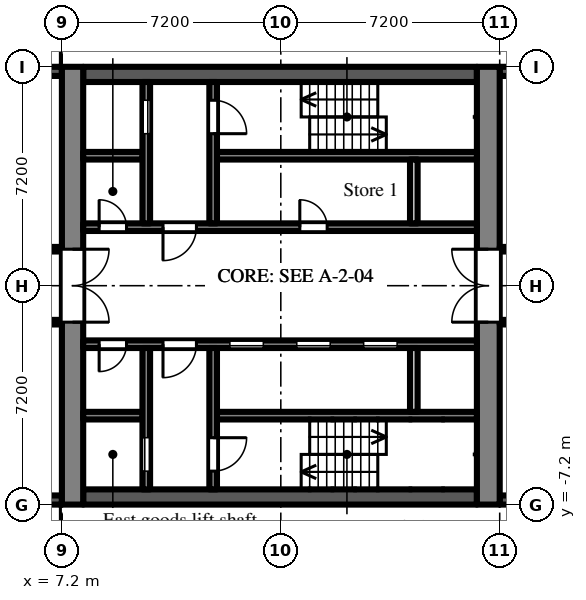
"""IFC4 building model, lengths in metres.
Left out: names, types, materials, properties, quantities, classifications, styles, units other than length and angle.
Written with IfcOpenShell. Run it as: python <this file> out.ifc"""

import sys

from ifc_helpers import new_model, si_unit, direction, frame, frame_2d, origin, place, context, subcontext, project, spatial, rectangle, extrude, element, fill, save


model = new_model("IFC4")
c1 = context("Model", 3, precision=1e-05, world=origin(), true_north=direction((0.0, 1.0)))
c2 = subcontext(c1, "Body", "Model", "MODEL_VIEW")
j1 = project(units=[si_unit("LENGTHUNIT", "METRE"), si_unit("PLANEANGLEUNIT", "RADIAN")], contexts=[c1])
p1 = place(None, origin())
s1 = spatial("IfcSite", under=j1, at=p1, CompositionType="ELEMENT")
p2 = place(p1, origin())
s2 = spatial("IfcBuilding", under=s1, at=p2, CompositionType="ELEMENT")
p3 = place(p2, frame((0.0, 0.0, 11.7)))
s3 = spatial("IfcBuildingStorey", under=s2, at=p3, CompositionType="ELEMENT", Elevation=11.7)
p4 = place(p3, frame((21.6, -7.05, 0.0), z_axis=(0.0, 0.0, 1.0), x_axis=(1.0, 0.0, 0.0)))
e1 = element("IfcWall", 1, at=p4, inside=s3, PredefinedType="SOLIDWALL", context=c2, shape_type="SweptSolid", body=[
    extrude(rectangle(XDim=2.7, YDim=0.3, at=frame_2d((1.35, 0.0))), origin(), (0.0, 0.0, 1.0), 2.1),
])
p5 = place(p4, frame((0.75, 0.0, 0.2)))
e2 = element("IfcOpeningElement", 2, at=p5, cuts=e1, PredefinedType="OPENING", context=c2, shape_type="SweptSolid", body=[
    extrude(rectangle(XDim=1.2, YDim=1.85, at=frame_2d((0.6, 0.925))), frame((0.0, 0.16, 0.0), z_axis=(0.0, -1.0, 0.0), x_axis=(1.0, 0.0, 0.0)), (0.0, 0.0, 1.0), 0.32),
])
p6 = place(p3, frame((24.3, 7.05, 0.0), z_axis=(0.0, 0.0, 1.0), x_axis=(-1.0, 0.0, 0.0)))
e3 = element("IfcWall", 3, at=p6, inside=s3, PredefinedType="SOLIDWALL", context=c2, shape_type="SweptSolid", body=[
    extrude(rectangle(XDim=2.7, YDim=0.3, at=frame_2d((1.35, 0.0))), origin(), (0.0, 0.0, 1.0), 2.1),
])
p7 = place(p6, frame((0.75, 0.0, 0.2)))
e4 = element("IfcOpeningElement", 4, at=p7, cuts=e3, PredefinedType="OPENING", context=c2, shape_type="SweptSolid", body=[
    extrude(rectangle(XDim=1.2, YDim=1.85, at=frame_2d((0.6, 0.925))), frame((0.0, 0.16, 0.0), z_axis=(0.0, -1.0, 0.0), x_axis=(1.0, 0.0, 0.0)), (0.0, 0.0, 1.0), 0.32),
])
for number, where, z_axis, x_axis in (
    (5, (7.2, 7.05, 0.0), (0.0, 0.0, 1.0), (-1.0, 0.0, 0.0)),
    (6, (4.2, -7.05, 0.0), (0.0, 0.0, 1.0), (1.0, 0.0, 0.0)),
):
    element("IfcWall", number, at=place(p3, frame(where, z_axis=z_axis, x_axis=x_axis)), inside=s3, PredefinedType="SOLIDWALL", context=c2, shape_type="SweptSolid", body=[
        extrude(rectangle(XDim=3.0, YDim=0.3, at=frame_2d((1.5, 0.0))), origin(), (0.0, 0.0, 1.0), 2.1),
    ])
p8 = place(p3, frame((7.55, -7.2, 0.0), z_axis=(0.0, 0.0, 1.0), x_axis=(0.0, 1.0, 0.0)))
e7 = element("IfcWall", 7, at=p8, inside=s3, PredefinedType="SHEAR", context=c2, shape_type="SweptSolid", body=[
    extrude(rectangle(XDim=14.4, YDim=0.7, at=frame_2d((7.2, 0.0))), origin(), (0.0, 0.0, 1.0), 2.575),
])
p9 = place(p8, frame((6.0, 0.0, 0.0)))
e8 = element("IfcOpeningElement", 8, at=p9, cuts=e7, PredefinedType="OPENING", context=c2, shape_type="SweptSolid", body=[
    extrude(rectangle(XDim=2.4, YDim=2.2, at=frame_2d((1.2, 1.1))), frame((0.0, 0.36, 0.0), z_axis=(0.0, -1.0, 0.0), x_axis=(1.0, 0.0, 0.0)), (0.0, 0.0, 1.0), 0.72),
])
p10 = place(p3, frame((21.225, -7.2, 0.0), z_axis=(0.0, 0.0, 1.0), x_axis=(0.0, 1.0, 0.0)))
e9 = element("IfcWall", 9, at=p10, inside=s3, PredefinedType="SHEAR", context=c2, shape_type="SweptSolid", body=[
    extrude(rectangle(XDim=14.4, YDim=0.75, at=frame_2d((7.2, 0.0))), origin(), (0.0, 0.0, 1.0), 2.575),
])
p11 = place(p10, frame((6.0, 0.0, 0.0)))
e10 = element("IfcOpeningElement", 10, at=p11, cuts=e9, PredefinedType="OPENING", context=c2, shape_type="SweptSolid", body=[
    extrude(rectangle(XDim=2.4, YDim=2.2, at=frame_2d((1.2, 1.1))), frame((0.0, 0.385, 0.0), z_axis=(0.0, -1.0, 0.0), x_axis=(1.0, 0.0, 0.0)), (0.0, 0.0, 1.0), 0.77),
])
p12 = place(p3, frame((7.9, 6.95, 0.0), z_axis=(0.0, 0.0, 1.0), x_axis=(1.0, 0.0, 0.0)))
e11 = element("IfcWall", 11, at=p12, inside=s3, PredefinedType="SHEAR", context=c2, shape_type="SweptSolid", body=[
    extrude(rectangle(XDim=12.95, YDim=0.5, at=frame_2d((6.475, 0.0))), origin(), (0.0, 0.0, 1.0), 2.575),
])
p13 = place(p3, frame((7.9, 1.925, 0.0), z_axis=(0.0, 0.0, 1.0), x_axis=(1.0, 0.0, 0.0)))
e12 = element("IfcWall", 12, at=p13, inside=s3, PredefinedType="SHEAR", context=c2, shape_type="SweptSolid", body=[
    extrude(rectangle(XDim=12.95, YDim=0.25, at=frame_2d((6.475, 0.0))), origin(), (0.0, 0.0, 1.0), 2.575),
])
p14 = place(p13, frame((0.525, 0.0, 0.0)))
e13 = element("IfcOpeningElement", 13, at=p14, cuts=e12, PredefinedType="OPENING", context=c2, shape_type="SweptSolid", body=[
    extrude(rectangle(XDim=0.9, YDim=2.1, at=frame_2d((0.45, 1.05))), frame((0.0, 0.135, 0.0), z_axis=(0.0, -1.0, 0.0), x_axis=(1.0, 0.0, 0.0)), (0.0, 0.0, 1.0), 0.27),
])
p15 = place(p13, frame((2.625, 0.0, 0.0)))
e14 = element("IfcOpeningElement", 14, at=p15, cuts=e12, PredefinedType="OPENING", context=c2, shape_type="SweptSolid", body=[
    extrude(rectangle(XDim=1.1, YDim=2.1, at=frame_2d((0.55, 1.05))), frame((0.0, 0.135, 0.0), z_axis=(0.0, -1.0, 0.0), x_axis=(1.0, 0.0, 0.0)), (0.0, 0.0, 1.0), 0.27),
])
p16 = place(p13, frame((7.125, 0.0, 0.0)))
e15 = element("IfcOpeningElement", 15, at=p16, cuts=e12, PredefinedType="OPENING", context=c2, shape_type="SweptSolid", body=[
    extrude(rectangle(XDim=0.9, YDim=2.1, at=frame_2d((0.45, 1.05))), frame((0.0, 0.135, 0.0), z_axis=(0.0, -1.0, 0.0), x_axis=(1.0, 0.0, 0.0)), (0.0, 0.0, 1.0), 0.27),
])
p17 = place(p3, frame((7.9, 4.275, 0.0), z_axis=(0.0, 0.0, 1.0), x_axis=(1.0, 0.0, 0.0)))
e16 = element("IfcWall", 16, at=p17, inside=s3, PredefinedType="SHEAR", context=c2, shape_type="SweptSolid", body=[
    extrude(rectangle(XDim=1.95, YDim=0.25, at=frame_2d((0.975, 0.0))), origin(), (0.0, 0.0, 1.0), 2.575),
])
p18 = place(p3, frame((12.3, 4.275, 0.0), z_axis=(0.0, 0.0, 1.0), x_axis=(1.0, 0.0, 0.0)))
e17 = element("IfcWall", 17, at=p18, inside=s3, PredefinedType="SHEAR", context=c2, shape_type="SweptSolid", body=[
    extrude(rectangle(XDim=8.55, YDim=0.25, at=frame_2d((4.275, 0.0))), origin(), (0.0, 0.0, 1.0), 2.575),
])
p19 = place(p3, frame((9.975, 2.05, 0.0), z_axis=(0.0, 0.0, 1.0), x_axis=(0.0, 1.0, 0.0)))
e18 = element("IfcWall", 18, at=p19, inside=s3, PredefinedType="SHEAR", context=c2, shape_type="SweptSolid", body=[
    extrude(rectangle(XDim=4.65, YDim=0.25, at=frame_2d((2.325, 0.0))), origin(), (0.0, 0.0, 1.0), 2.575),
])
p20 = place(p19, frame((2.95, 0.0, 0.0)))
e19 = element("IfcOpeningElement", 19, at=p20, cuts=e18, PredefinedType="OPENING", context=c2, shape_type="SweptSolid", body=[
    extrude(rectangle(XDim=1.1, YDim=2.1, at=frame_2d((0.55, 1.05))), frame((0.0, 0.135, 0.0), z_axis=(0.0, -1.0, 0.0), x_axis=(1.0, 0.0, 0.0)), (0.0, 0.0, 1.0), 0.27),
])
p21 = place(p3, frame((12.175, 2.05, 0.0), z_axis=(0.0, 0.0, 1.0), x_axis=(0.0, 1.0, 0.0)))
e20 = element("IfcWall", 20, at=p21, inside=s3, PredefinedType="SHEAR", context=c2, shape_type="SweptSolid", body=[
    extrude(rectangle(XDim=4.65, YDim=0.25, at=frame_2d((2.325, 0.0))), origin(), (0.0, 0.0, 1.0), 2.575),
])
p22 = place(p21, frame((2.95, 0.0, 0.0)))
e21 = element("IfcOpeningElement", 21, at=p22, cuts=e20, PredefinedType="OPENING", context=c2, shape_type="SweptSolid", body=[
    extrude(rectangle(XDim=1.1, YDim=2.1, at=frame_2d((0.55, 1.05))), frame((0.0, 0.135, 0.0), z_axis=(0.0, -1.0, 0.0), x_axis=(1.0, 0.0, 0.0)), (0.0, 0.0, 1.0), 0.27),
])
p23 = place(p3, frame((18.775, 2.05, 0.0), z_axis=(0.0, 0.0, 1.0), x_axis=(0.0, 1.0, 0.0)))
e22 = element("IfcWall", 22, at=p23, inside=s3, PredefinedType="PARTITIONING", context=c2, shape_type="SweptSolid", body=[
    extrude(rectangle(XDim=2.1, YDim=0.25, at=frame_2d((1.05, 0.0))), origin(), (0.0, 0.0, 1.0), 2.575),
])
p24 = place(p3, frame((7.9, -6.95, 0.0), z_axis=(0.0, 0.0, 1.0), x_axis=(1.0, 0.0, 0.0)))
e23 = element("IfcWall", 23, at=p24, inside=s3, PredefinedType="SHEAR", context=c2, shape_type="SweptSolid", body=[
    extrude(rectangle(XDim=12.95, YDim=0.5, at=frame_2d((6.475, 0.0))), origin(), (0.0, 0.0, 1.0), 2.575),
])
p25 = place(p3, frame((7.9, -1.925, 0.0), z_axis=(0.0, 0.0, 1.0), x_axis=(1.0, 0.0, 0.0)))
e24 = element("IfcWall", 24, at=p25, inside=s3, PredefinedType="SHEAR", context=c2, shape_type="SweptSolid", body=[
    extrude(rectangle(XDim=12.95, YDim=0.25, at=frame_2d((6.475, 0.0))), origin(), (0.0, 0.0, 1.0), 2.575),
])
p26 = place(p25, frame((4.825, 0.0, 0.0)))
e25 = element("IfcOpeningElement", 25, at=p26, cuts=e24, PredefinedType="OPENING", context=c2, shape_type="SweptSolid", body=[
    extrude(rectangle(XDim=1.1, YDim=2.1, at=frame_2d((0.55, 1.05))), frame((0.0, 0.135, 0.0), z_axis=(0.0, -1.0, 0.0), x_axis=(1.0, 0.0, 0.0)), (0.0, 0.0, 1.0), 0.27),
])
p27 = place(p25, frame((7.025, 0.0, 0.0)))
e26 = element("IfcOpeningElement", 26, at=p27, cuts=e24, PredefinedType="OPENING", context=c2, shape_type="SweptSolid", body=[
    extrude(rectangle(XDim=1.1, YDim=2.1, at=frame_2d((0.55, 1.05))), frame((0.0, 0.135, 0.0), z_axis=(0.0, -1.0, 0.0), x_axis=(1.0, 0.0, 0.0)), (0.0, 0.0, 1.0), 0.27),
])
p28 = place(p25, frame((9.225, 0.0, 0.0)))
e27 = element("IfcOpeningElement", 27, at=p28, cuts=e24, PredefinedType="OPENING", context=c2, shape_type="SweptSolid", body=[
    extrude(rectangle(XDim=1.1, YDim=2.1, at=frame_2d((0.55, 1.05))), frame((0.0, 0.135, 0.0), z_axis=(0.0, -1.0, 0.0), x_axis=(1.0, 0.0, 0.0)), (0.0, 0.0, 1.0), 0.27),
])
p29 = place(p25, frame((0.525, 0.0, 0.0)))
e28 = element("IfcOpeningElement", 28, at=p29, cuts=e24, PredefinedType="OPENING", context=c2, shape_type="SweptSolid", body=[
    extrude(rectangle(XDim=0.9, YDim=2.1, at=frame_2d((0.45, 1.05))), frame((0.0, 0.135, 0.0), z_axis=(0.0, -1.0, 0.0), x_axis=(1.0, 0.0, 0.0)), (0.0, 0.0, 1.0), 0.27),
])
p30 = place(p25, frame((2.625, 0.0, 0.0)))
e29 = element("IfcOpeningElement", 29, at=p30, cuts=e24, PredefinedType="OPENING", context=c2, shape_type="SweptSolid", body=[
    extrude(rectangle(XDim=1.1, YDim=2.1, at=frame_2d((0.55, 1.05))), frame((0.0, 0.135, 0.0), z_axis=(0.0, -1.0, 0.0), x_axis=(1.0, 0.0, 0.0)), (0.0, 0.0, 1.0), 0.27),
])
p31 = place(p3, frame((7.9, -4.275, 0.0), z_axis=(0.0, 0.0, 1.0), x_axis=(1.0, 0.0, 0.0)))
e30 = element("IfcWall", 30, at=p31, inside=s3, PredefinedType="SHEAR", context=c2, shape_type="SweptSolid", body=[
    extrude(rectangle(XDim=1.95, YDim=0.25, at=frame_2d((0.975, 0.0))), origin(), (0.0, 0.0, 1.0), 2.575),
])
p32 = place(p3, frame((12.3, -4.275, 0.0), z_axis=(0.0, 0.0, 1.0), x_axis=(1.0, 0.0, 0.0)))
e31 = element("IfcWall", 31, at=p32, inside=s3, PredefinedType="SHEAR", context=c2, shape_type="SweptSolid", body=[
    extrude(rectangle(XDim=8.55, YDim=0.25, at=frame_2d((4.275, 0.0))), origin(), (0.0, 0.0, 1.0), 2.575),
])
p33 = place(p3, frame((9.975, -2.05, 0.0), z_axis=(0.0, 0.0, 1.0), x_axis=(0.0, -1.0, 0.0)))
e32 = element("IfcWall", 32, at=p33, inside=s3, PredefinedType="SHEAR", context=c2, shape_type="SweptSolid", body=[
    extrude(rectangle(XDim=4.65, YDim=0.25, at=frame_2d((2.325, 0.0))), origin(), (0.0, 0.0, 1.0), 2.575),
])
p34 = place(p33, frame((2.95, 0.0, 0.0)))
e33 = element("IfcOpeningElement", 33, at=p34, cuts=e32, PredefinedType="OPENING", context=c2, shape_type="SweptSolid", body=[
    extrude(rectangle(XDim=1.1, YDim=2.1, at=frame_2d((0.55, 1.05))), frame((0.0, 0.135, 0.0), z_axis=(0.0, -1.0, 0.0), x_axis=(1.0, 0.0, 0.0)), (0.0, 0.0, 1.0), 0.27),
])
p35 = place(p3, frame((12.175, -2.05, 0.0), z_axis=(0.0, 0.0, 1.0), x_axis=(0.0, -1.0, 0.0)))
e34 = element("IfcWall", 34, at=p35, inside=s3, PredefinedType="SHEAR", context=c2, shape_type="SweptSolid", body=[
    extrude(rectangle(XDim=4.65, YDim=0.25, at=frame_2d((2.325, 0.0))), origin(), (0.0, 0.0, 1.0), 2.575),
])
p36 = place(p35, frame((2.95, 0.0, 0.0)))
e35 = element("IfcOpeningElement", 35, at=p36, cuts=e34, PredefinedType="OPENING", context=c2, shape_type="SweptSolid", body=[
    extrude(rectangle(XDim=1.1, YDim=2.1, at=frame_2d((0.55, 1.05))), frame((0.0, 0.135, 0.0), z_axis=(0.0, -1.0, 0.0), x_axis=(1.0, 0.0, 0.0)), (0.0, 0.0, 1.0), 0.27),
])
p37 = place(p3, frame((18.775, -2.05, 0.0), z_axis=(0.0, 0.0, 1.0), x_axis=(0.0, -1.0, 0.0)))
e36 = element("IfcWall", 36, at=p37, inside=s3, PredefinedType="PARTITIONING", context=c2, shape_type="SweptSolid", body=[
    extrude(rectangle(XDim=2.1, YDim=0.25, at=frame_2d((1.05, 0.0))), origin(), (0.0, 0.0, 1.0), 2.575),
])
p38 = place(p3, frame((1.275, -1.2, 0.0), z_axis=(0.0, 0.0, 1.0), x_axis=(1.0, 0.0, 0.0)))
e37 = element("IfcWall", 37, at=p38, inside=s3, PredefinedType="PARTITIONING", context=c2, shape_type="SweptSolid", body=[
    extrude(rectangle(XDim=5.925, YDim=0.15, at=frame_2d((2.962, 0.0))), origin(), (0.0, 0.0, 1.0), 2.575),
])
p39 = place(p38, frame((3.075, 0.0, 0.0)))
e38 = element("IfcOpeningElement", 38, at=p39, cuts=e37, PredefinedType="OPENING", context=c2, shape_type="SweptSolid", body=[
    extrude(rectangle(XDim=0.9, YDim=2.1, at=frame_2d((0.45, 1.05))), frame((0.0, 0.085, 0.0), z_axis=(0.0, -1.0, 0.0), x_axis=(1.0, 0.0, 0.0)), (0.0, 0.0, 1.0), 0.17),
])
p40 = place(p3, frame((1.275, 1.2, 0.0), z_axis=(0.0, 0.0, 1.0), x_axis=(1.0, 0.0, 0.0)))
e39 = element("IfcWall", 39, at=p40, inside=s3, PredefinedType="PARTITIONING", context=c2, shape_type="SweptSolid", body=[
    extrude(rectangle(XDim=5.925, YDim=0.15, at=frame_2d((2.962, 0.0))), origin(), (0.0, 0.0, 1.0), 2.575),
])
p41 = place(p40, frame((3.975, 0.0, 0.0)))
e40 = element("IfcOpeningElement", 40, at=p41, cuts=e39, PredefinedType="OPENING", context=c2, shape_type="SweptSolid", body=[
    extrude(rectangle(XDim=0.9, YDim=2.1, at=frame_2d((0.45, 1.05))), frame((0.0, 0.085, 0.0), z_axis=(0.0, -1.0, 0.0), x_axis=(1.0, 0.0, 0.0)), (0.0, 0.0, 1.0), 0.17),
])
p42 = place(p3, frame((21.6, -1.2, 0.0), z_axis=(0.0, 0.0, 1.0), x_axis=(1.0, 0.0, 0.0)))
e41 = element("IfcWall", 41, at=p42, inside=s3, PredefinedType="PARTITIONING", context=c2, shape_type="SweptSolid", body=[
    extrude(rectangle(XDim=14.9, YDim=0.15, at=frame_2d((7.45, 0.0))), origin(), (0.0, 0.0, 1.0), 2.575),
])
p43 = place(p42, frame((2.7, 0.0, 0.0)))
e42 = element("IfcOpeningElement", 42, at=p43, cuts=e41, PredefinedType="OPENING", context=c2, shape_type="SweptSolid", body=[
    extrude(rectangle(XDim=1.8, YDim=2.1, at=frame_2d((0.9, 1.05))), frame((0.0, 0.085, 0.0), z_axis=(0.0, -1.0, 0.0), x_axis=(1.0, 0.0, 0.0)), (0.0, 0.0, 1.0), 0.17),
])
p44 = place(p42, frame((7.65, 0.0, 0.0)))
e43 = element("IfcOpeningElement", 43, at=p44, cuts=e41, PredefinedType="OPENING", context=c2, shape_type="SweptSolid", body=[
    extrude(rectangle(XDim=0.9, YDim=2.1, at=frame_2d((0.45, 1.05))), frame((0.0, 0.085, 0.0), z_axis=(0.0, -1.0, 0.0), x_axis=(1.0, 0.0, 0.0)), (0.0, 0.0, 1.0), 0.17),
])
p45 = place(p42, frame((9.45, 0.0, 0.0)))
e44 = element("IfcOpeningElement", 44, at=p45, cuts=e41, PredefinedType="OPENING", context=c2, shape_type="SweptSolid", body=[
    extrude(rectangle(XDim=0.9, YDim=2.1, at=frame_2d((0.45, 1.05))), frame((0.0, 0.085, 0.0), z_axis=(0.0, -1.0, 0.0), x_axis=(1.0, 0.0, 0.0)), (0.0, 0.0, 1.0), 0.17),
])
p46 = place(p42, frame((11.95, 0.0, 0.0)))
e45 = element("IfcOpeningElement", 45, at=p46, cuts=e41, PredefinedType="OPENING", context=c2, shape_type="SweptSolid", body=[
    extrude(rectangle(XDim=1.8, YDim=2.1, at=frame_2d((0.9, 1.05))), frame((0.0, 0.085, 0.0), z_axis=(0.0, -1.0, 0.0), x_axis=(1.0, 0.0, 0.0)), (0.0, 0.0, 1.0), 0.17),
])
p47 = place(p3, frame((21.6, 1.2, 0.0), z_axis=(0.0, 0.0, 1.0), x_axis=(1.0, 0.0, 0.0)))
e46 = element("IfcWall", 46, at=p47, inside=s3, PredefinedType="PARTITIONING", context=c2, shape_type="SweptSolid", body=[
    extrude(rectangle(XDim=14.9, YDim=0.15, at=frame_2d((7.45, 0.0))), origin(), (0.0, 0.0, 1.0), 2.575),
])
p48 = place(p47, frame((6.0, 0.0, 0.0)))
e47 = element("IfcOpeningElement", 47, at=p48, cuts=e46, PredefinedType="OPENING", context=c2, shape_type="SweptSolid", body=[
    extrude(rectangle(XDim=1.0, YDim=2.1, at=frame_2d((0.5, 1.05))), frame((0.0, 0.085, 0.0), z_axis=(0.0, -1.0, 0.0), x_axis=(1.0, 0.0, 0.0)), (0.0, 0.0, 1.0), 0.17),
])
p49 = place(p47, frame((7.65, 0.0, 0.0)))
e48 = element("IfcOpeningElement", 48, at=p49, cuts=e46, PredefinedType="OPENING", context=c2, shape_type="SweptSolid", body=[
    extrude(rectangle(XDim=0.9, YDim=2.1, at=frame_2d((0.45, 1.05))), frame((0.0, 0.085, 0.0), z_axis=(0.0, -1.0, 0.0), x_axis=(1.0, 0.0, 0.0)), (0.0, 0.0, 1.0), 0.17),
])
p50 = place(p47, frame((9.45, 0.0, 0.0)))
e49 = element("IfcOpeningElement", 49, at=p50, cuts=e46, PredefinedType="OPENING", context=c2, shape_type="SweptSolid", body=[
    extrude(rectangle(XDim=0.9, YDim=2.1, at=frame_2d((0.45, 1.05))), frame((0.0, 0.085, 0.0), z_axis=(0.0, -1.0, 0.0), x_axis=(1.0, 0.0, 0.0)), (0.0, 0.0, 1.0), 0.17),
])
p51 = place(p47, frame((11.95, 0.0, 0.0)))
e50 = element("IfcOpeningElement", 50, at=p51, cuts=e46, PredefinedType="OPENING", context=c2, shape_type="SweptSolid", body=[
    extrude(rectangle(XDim=1.8, YDim=2.1, at=frame_2d((0.9, 1.05))), frame((0.0, 0.085, 0.0), z_axis=(0.0, -1.0, 0.0), x_axis=(1.0, 0.0, 0.0)), (0.0, 0.0, 1.0), 0.17),
])
p52 = place(p26, origin())
e51 = element("IfcDoor", 51, at=p52, inside=s3, OperationType="SLIDING_TO_LEFT", PredefinedType="DOOR", context=c2, shape_type="SweptSolid", body=[
    extrude(rectangle(XDim=1.1, YDim=2.1, at=frame_2d((0.55, 1.05))), frame((0.0, 0.025, 0.0), z_axis=(0.0, -1.0, 0.0), x_axis=(1.0, 0.0, 0.0)), (0.0, 0.0, 1.0), 0.05),
])
fill(e25, e51)
p53 = place(p27, origin())
e52 = element("IfcDoor", 52, at=p53, inside=s3, OperationType="SLIDING_TO_LEFT", PredefinedType="DOOR", context=c2, shape_type="SweptSolid", body=[
    extrude(rectangle(XDim=1.1, YDim=2.1, at=frame_2d((0.55, 1.05))), frame((0.0, 0.025, 0.0), z_axis=(0.0, -1.0, 0.0), x_axis=(1.0, 0.0, 0.0)), (0.0, 0.0, 1.0), 0.05),
])
fill(e26, e52)
p54 = place(p28, origin())
e53 = element("IfcDoor", 53, at=p54, inside=s3, OperationType="SLIDING_TO_LEFT", PredefinedType="DOOR", context=c2, shape_type="SweptSolid", body=[
    extrude(rectangle(XDim=1.1, YDim=2.1, at=frame_2d((0.55, 1.05))), frame((0.0, 0.025, 0.0), z_axis=(0.0, -1.0, 0.0), x_axis=(1.0, 0.0, 0.0)), (0.0, 0.0, 1.0), 0.05),
])
fill(e27, e53)
p55 = place(p20, origin())
e54 = element("IfcDoor", 54, at=p55, inside=s3, OperationType="SLIDING_TO_LEFT", PredefinedType="DOOR", context=c2, shape_type="SweptSolid", body=[
    extrude(rectangle(XDim=1.1, YDim=2.1, at=frame_2d((0.55, 1.05))), frame((0.0, 0.025, 0.0), z_axis=(0.0, -1.0, 0.0), x_axis=(1.0, 0.0, 0.0)), (0.0, 0.0, 1.0), 0.05),
])
fill(e19, e54)
p56 = place(p34, origin())
e55 = element("IfcDoor", 55, at=p56, inside=s3, OperationType="SLIDING_TO_LEFT", PredefinedType="DOOR", context=c2, shape_type="SweptSolid", body=[
    extrude(rectangle(XDim=1.1, YDim=2.1, at=frame_2d((0.55, 1.05))), frame((0.0, 0.025, 0.0), z_axis=(0.0, -1.0, 0.0), x_axis=(1.0, 0.0, 0.0)), (0.0, 0.0, 1.0), 0.05),
])
fill(e33, e55)
p57 = place(p22, frame((1.1, 0.0, 0.0), z_axis=(0.0, 0.0, 1.0), x_axis=(-1.0, 0.0, 0.0)))
e56 = element("IfcDoor", 56, at=p57, inside=s3, OperationType="SINGLE_SWING_RIGHT", PredefinedType="DOOR", context=c2, shape_type="SweptSolid", body=[
    extrude(rectangle(XDim=1.1, YDim=2.1, at=frame_2d((0.55, 1.05))), frame((0.0, 0.025, 0.0), z_axis=(0.0, -1.0, 0.0), x_axis=(1.0, 0.0, 0.0)), (0.0, 0.0, 1.0), 0.05),
])
fill(e21, e56)
p58 = place(p36, origin())
e57 = element("IfcDoor", 57, at=p58, inside=s3, OperationType="SINGLE_SWING_LEFT", PredefinedType="DOOR", context=c2, shape_type="SweptSolid", body=[
    extrude(rectangle(XDim=1.1, YDim=2.1, at=frame_2d((0.55, 1.05))), frame((0.0, 0.025, 0.0), z_axis=(0.0, -1.0, 0.0), x_axis=(1.0, 0.0, 0.0)), (0.0, 0.0, 1.0), 0.05),
])
fill(e35, e57)
p59 = place(p14, origin())
e58 = element("IfcDoor", 58, at=p59, inside=s3, OperationType="SINGLE_SWING_LEFT", PredefinedType="DOOR", context=c2, shape_type="SweptSolid", body=[
    extrude(rectangle(XDim=0.9, YDim=2.1, at=frame_2d((0.45, 1.05))), frame((0.0, 0.025, 0.0), z_axis=(0.0, -1.0, 0.0), x_axis=(1.0, 0.0, 0.0)), (0.0, 0.0, 1.0), 0.05),
])
fill(e13, e58)
p60 = place(p29, frame((0.9, 0.0, 0.0), z_axis=(0.0, 0.0, 1.0), x_axis=(-1.0, 0.0, 0.0)))
e59 = element("IfcDoor", 59, at=p60, inside=s3, OperationType="SINGLE_SWING_RIGHT", PredefinedType="DOOR", context=c2, shape_type="SweptSolid", body=[
    extrude(rectangle(XDim=0.9, YDim=2.1, at=frame_2d((0.45, 1.05))), frame((0.0, 0.025, 0.0), z_axis=(0.0, -1.0, 0.0), x_axis=(1.0, 0.0, 0.0)), (0.0, 0.0, 1.0), 0.05),
])
fill(e28, e59)
p61 = place(p15, frame((1.1, 0.0, 0.0), z_axis=(0.0, 0.0, 1.0), x_axis=(-1.0, 0.0, 0.0)))
e60 = element("IfcDoor", 60, at=p61, inside=s3, OperationType="SINGLE_SWING_RIGHT", PredefinedType="DOOR", context=c2, shape_type="SweptSolid", body=[
    extrude(rectangle(XDim=1.1, YDim=2.1, at=frame_2d((0.55, 1.05))), frame((0.0, 0.025, 0.0), z_axis=(0.0, -1.0, 0.0), x_axis=(1.0, 0.0, 0.0)), (0.0, 0.0, 1.0), 0.05),
])
fill(e14, e60)
p62 = place(p30, frame((1.1, 0.0, 0.0), z_axis=(0.0, 0.0, 1.0), x_axis=(-1.0, 0.0, 0.0)))
e61 = element("IfcDoor", 61, at=p62, inside=s3, OperationType="SINGLE_SWING_RIGHT", PredefinedType="DOOR", context=c2, shape_type="SweptSolid", body=[
    extrude(rectangle(XDim=1.1, YDim=2.1, at=frame_2d((0.55, 1.05))), frame((0.0, 0.025, 0.0), z_axis=(0.0, -1.0, 0.0), x_axis=(1.0, 0.0, 0.0)), (0.0, 0.0, 1.0), 0.05),
])
fill(e29, e61)
p63 = place(p9, frame((2.4, 0.0, 0.0), z_axis=(0.0, 0.0, 1.0), x_axis=(-1.0, 0.0, 0.0)))
e62 = element("IfcDoor", 62, at=p63, inside=s3, OperationType="DOUBLE_DOOR_DOUBLE_SWING", PredefinedType="DOOR", context=c2, shape_type="SweptSolid", body=[
    extrude(rectangle(XDim=2.4, YDim=2.2, at=frame_2d((1.2, 1.1))), frame((0.0, 0.025, 0.0), z_axis=(0.0, -1.0, 0.0), x_axis=(1.0, 0.0, 0.0)), (0.0, 0.0, 1.0), 0.05),
])
fill(e8, e62)
p64 = place(p11, origin())
e63 = element("IfcDoor", 63, at=p64, inside=s3, OperationType="DOUBLE_DOOR_DOUBLE_SWING", PredefinedType="DOOR", context=c2, shape_type="SweptSolid", body=[
    extrude(rectangle(XDim=2.4, YDim=2.2, at=frame_2d((1.2, 1.1))), frame((0.0, 0.025, 0.0), z_axis=(0.0, -1.0, 0.0), x_axis=(1.0, 0.0, 0.0)), (0.0, 0.0, 1.0), 0.05),
])
fill(e10, e63)
p65 = place(p16, origin())
e64 = element("IfcDoor", 64, at=p65, inside=s3, OperationType="SINGLE_SWING_LEFT", PredefinedType="DOOR", context=c2, shape_type="SweptSolid", body=[
    extrude(rectangle(XDim=0.9, YDim=2.1, at=frame_2d((0.45, 1.05))), frame((0.0, 0.025, 0.0), z_axis=(0.0, -1.0, 0.0), x_axis=(1.0, 0.0, 0.0)), (0.0, 0.0, 1.0), 0.05),
])
fill(e15, e64)
save(model, sys.argv[1])
